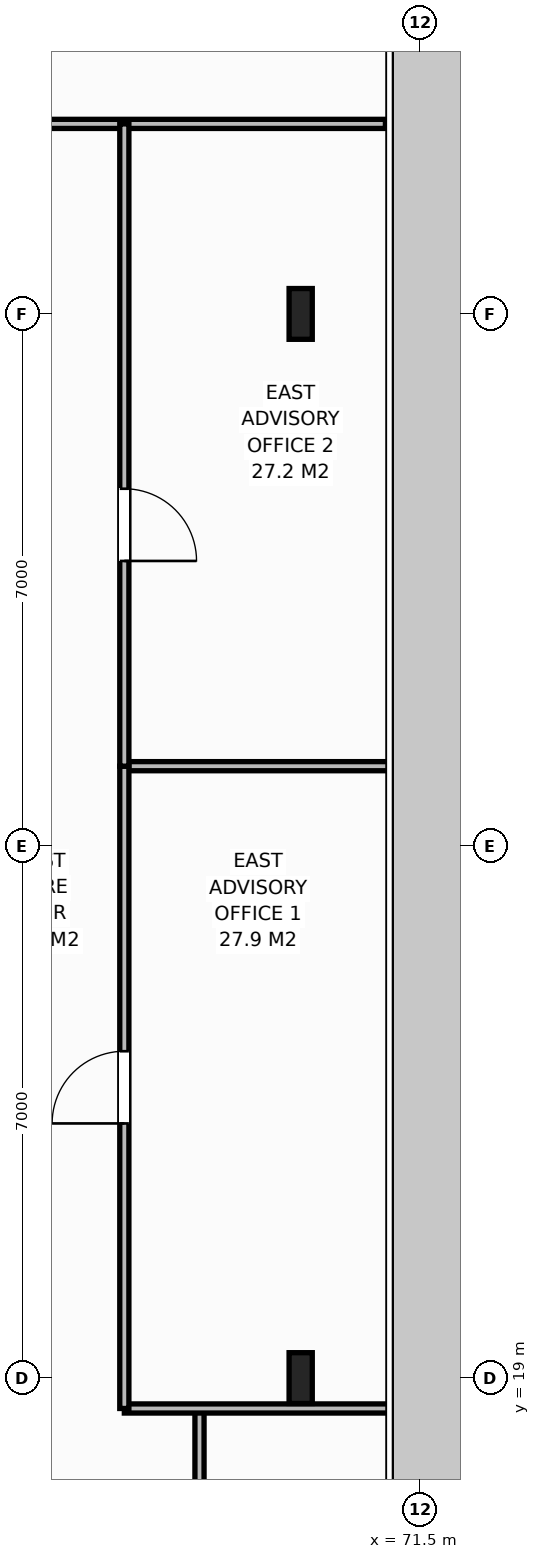
"""IFC4 building model, lengths in metres.
Left out: names, types, materials, properties, quantities, classifications, styles, units other than length and angle.
Written with IfcOpenShell. Run it as: python <this file> out.ifc"""

import sys

from ifc_helpers import new_model, si_unit, direction, frame, frame_2d, origin, origin_2d, place, context, subcontext, project, spatial, rectangle, i_section, extrude, element, fill, save


model = new_model("IFC4")
c1 = context("Model", 3, precision=1e-05, world=origin(), true_north=direction((0.0, 1.0)))
c2 = subcontext(c1, "Body", "Model", "MODEL_VIEW")
j1 = project(units=[si_unit("LENGTHUNIT", "METRE"), si_unit("PLANEANGLEUNIT", "RADIAN")], contexts=[c1])
p1 = place(None, origin())
s1 = spatial("IfcSite", under=j1, at=p1, CompositionType="ELEMENT")
p2 = place(p1, origin())
s2 = spatial("IfcBuilding", under=s1, at=p2, CompositionType="ELEMENT")
p3 = place(p2, frame((0.0, 0.0, 267.0)))
s3 = spatial("IfcBuildingStorey", under=s2, at=p3, CompositionType="ELEMENT", Elevation=267.0)
for number, where, z_axis, x_axis in (
    (1, (69.92, 19.0, 0.0), (0.0, 0.0, 1.0), (1.0, 0.0, 0.0)),
    (2, (69.92, 33.0, 0.0), (0.0, 0.0, 1.0), (1.0, 0.0, 0.0)),
):
    element("IfcColumn", number, at=place(p3, frame(where, z_axis=z_axis, x_axis=x_axis)), inside=s3, PredefinedType="COLUMN", context=c2, shape_type="SweptSolid", body=[
        extrude(i_section(OverallWidth=0.305, OverallDepth=0.668, WebThickness=0.021, FlangeThickness=0.04, at=origin_2d()), origin(), (0.0, 0.0, 1.0), 3.8),
    ])
p4 = place(p3, frame((68.589, 16.5, 0.0), z_axis=(0.0, 0.0, 1.0), x_axis=(0.0, 1.0, 0.0)))
e3 = element("IfcWall", 3, at=p4, inside=s3, PredefinedType="PARTITIONING", context=c2, shape_type="SweptSolid", body=[
    extrude(rectangle(XDim=2.1, YDim=0.12, at=frame_2d((1.05, 0.0))), origin(), (0.0, 0.0, 1.0), 3.588),
])
p5 = place(p3, frame((61.464, 35.5, 0.0), z_axis=(0.0, 0.0, 1.0), x_axis=(1.0, 0.0, 0.0)))
e4 = element("IfcWall", 4, at=p5, inside=s3, PredefinedType="PARTITIONING", context=c2, shape_type="SweptSolid", body=[
    extrude(rectangle(XDim=9.571, YDim=0.12, at=frame_2d((4.785, 0.0))), origin(), (0.0, 0.0, 1.0), 3.588),
])
p6 = place(p5, frame((0.48, 0.0, 0.0)))
e5 = element("IfcOpeningElement", 5, at=p6, cuts=e4, PredefinedType="OPENING", context=c2, shape_type="SweptSolid", body=[
    extrude(rectangle(XDim=0.95, YDim=2.15, at=frame_2d((0.475, 1.075))), frame((0.0, 0.07, 0.0), z_axis=(0.0, -1.0, 0.0), x_axis=(1.0, 0.0, 0.0)), (0.0, 0.0, 1.0), 0.14),
])
for number, where, z_axis, x_axis in (
    (6, (67.6, 18.6, 0.0), (0.0, 0.0, 1.0), (1.0, 0.0, 0.0)),
    (7, (67.6, 27.05, 0.0), (0.0, 0.0, 1.0), (1.0, 0.0, 0.0)),
):
    element("IfcWall", number, at=place(p3, frame(where, z_axis=z_axis, x_axis=x_axis)), inside=s3, PredefinedType="PARTITIONING", context=c2, shape_type="SweptSolid", body=[
        extrude(rectangle(XDim=3.595, YDim=0.12, at=frame_2d((1.797, 0.0))), origin(), (0.0, 0.0, 1.0), 3.588),
    ])
p7 = place(p3, frame((67.6, 18.6, 0.0), z_axis=(0.0, 0.0, 1.0), x_axis=(0.0, 1.0, 0.0)))
e8 = element("IfcWall", 8, at=p7, inside=s3, PredefinedType="PARTITIONING", context=c2, shape_type="SweptSolid", body=[
    extrude(rectangle(XDim=8.45, YDim=0.12, at=frame_2d((4.225, 0.0))), origin(), (0.0, 0.0, 1.0), 3.588),
])
p8 = place(p7, frame((3.75, 0.0, 0.0)))
e9 = element("IfcOpeningElement", 9, at=p8, cuts=e8, PredefinedType="OPENING", context=c2, shape_type="SweptSolid", body=[
    extrude(rectangle(XDim=0.95, YDim=2.15, at=frame_2d((0.475, 1.075))), frame((0.0, 0.07, 0.0), z_axis=(0.0, -1.0, 0.0), x_axis=(1.0, 0.0, 0.0)), (0.0, 0.0, 1.0), 0.14),
])
p9 = place(p3, frame((67.6, 27.05, 0.0), z_axis=(0.0, 0.0, 1.0), x_axis=(0.0, 1.0, 0.0)))
e10 = element("IfcWall", 10, at=p9, inside=s3, PredefinedType="PARTITIONING", context=c2, shape_type="SweptSolid", body=[
    extrude(rectangle(XDim=8.45, YDim=0.12, at=frame_2d((4.225, 0.0))), origin(), (0.0, 0.0, 1.0), 3.588),
])
p10 = place(p9, frame((2.7, 0.0, 0.0)))
e11 = element("IfcOpeningElement", 11, at=p10, cuts=e10, PredefinedType="OPENING", context=c2, shape_type="SweptSolid", body=[
    extrude(rectangle(XDim=0.95, YDim=2.15, at=frame_2d((0.475, 1.075))), frame((0.0, 0.07, 0.0), z_axis=(0.0, -1.0, 0.0), x_axis=(1.0, 0.0, 0.0)), (0.0, 0.0, 1.0), 0.14),
])
p11 = place(p8, origin())
e12 = element("IfcDoor", 12, at=p11, inside=s3, OperationType="SINGLE_SWING_LEFT", PredefinedType="DOOR", context=c2, shape_type="SweptSolid", body=[
    extrude(rectangle(XDim=0.95, YDim=2.15, at=frame_2d((0.475, 1.075))), frame((0.0, 0.025, 0.0), z_axis=(0.0, -1.0, 0.0), x_axis=(1.0, 0.0, 0.0)), (0.0, 0.0, 1.0), 0.05),
])
fill(e9, e12)
p12 = place(p10, origin())
e13 = element("IfcDoor", 13, at=p12, inside=s3, OperationType="SINGLE_SWING_RIGHT", PredefinedType="DOOR", context=c2, shape_type="SweptSolid", body=[
    extrude(rectangle(XDim=0.95, YDim=2.15, at=frame_2d((0.475, 1.075))), frame((0.0, 0.025, 0.0), z_axis=(0.0, -1.0, 0.0), x_axis=(1.0, 0.0, 0.0)), (0.0, 0.0, 1.0), 0.05),
])
fill(e11, e13)
save(model, sys.argv[1])
